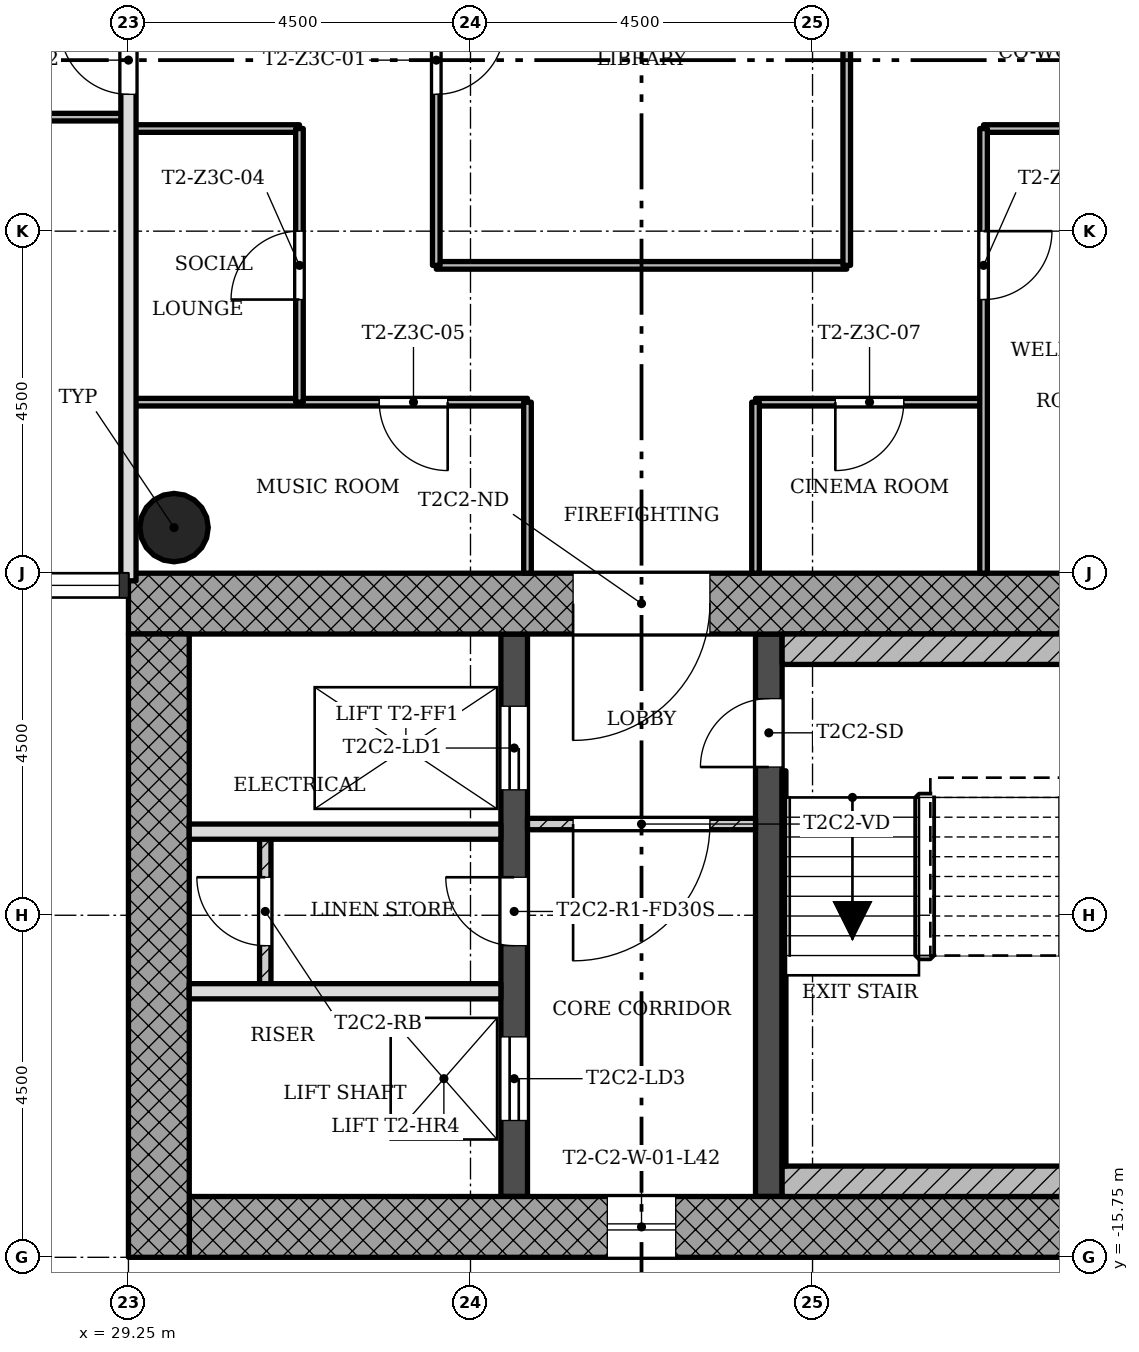
"""IFC4 building model, lengths in metres.
Left out: names, types, materials, properties, quantities, classifications, styles, units other than length and angle.
Written with IfcOpenShell. Run it as: python <this file> out.ifc"""

import sys

from ifc_helpers import new_model, si_unit, direction, frame, frame_2d, origin, origin_2d, place, context, subcontext, project, spatial, rectangle, hollow_circle, extrude, element, fill, save


model = new_model("IFC4")
c1 = context("Model", 3, precision=1e-05, world=origin(), true_north=direction((0.0, 1.0)))
c2 = subcontext(c1, "Body", "Model", "MODEL_VIEW")
j1 = project(units=[si_unit("LENGTHUNIT", "METRE"), si_unit("PLANEANGLEUNIT", "RADIAN")], contexts=[c1])
p1 = place(None, origin())
s1 = spatial("IfcSite", under=j1, at=p1, CompositionType="ELEMENT")
p2 = place(p1, origin())
s2 = spatial("IfcBuilding", under=s1, at=p2, CompositionType="ELEMENT")
p3 = place(p2, frame((0.0, 0.0, 154.1)))
s3 = spatial("IfcBuildingStorey", under=s2, at=p3, CompositionType="ELEMENT", Elevation=154.1)
p4 = place(p3, frame((30.05, -15.35, 0.0), z_axis=(0.0, 0.0, 1.0), x_axis=(1.0, 0.0, 0.0)))
e1 = element("IfcWall", 1, at=p4, inside=s3, PredefinedType="SHEAR", context=c2, shape_type="SweptSolid", body=[
    extrude(rectangle(XDim=12.7, YDim=0.8, at=frame_2d((6.35, 0.0))), origin(), (0.0, 0.0, 1.0), 3.4),
])
p5 = place(p4, frame((5.5, 0.0, 0.45)))
e2 = element("IfcOpeningElement", 2, at=p5, cuts=e1, PredefinedType="OPENING", context=c2, shape_type="SweptSolid", body=[
    extrude(rectangle(XDim=0.9, YDim=2.4, at=frame_2d((0.45, 1.2))), frame((0.0, 0.41, 0.0), z_axis=(0.0, -1.0, 0.0), x_axis=(1.0, 0.0, 0.0)), (0.0, 0.0, 1.0), 0.82),
])
p6 = place(p3, frame((41.95, -7.15, 0.0), z_axis=(0.0, 0.0, 1.0), x_axis=(-1.0, 0.0, 0.0)))
e3 = element("IfcWall", 3, at=p6, inside=s3, PredefinedType="SHEAR", context=c2, shape_type="SweptSolid", body=[
    extrude(rectangle(XDim=12.7, YDim=0.8, at=frame_2d((6.35, 0.0))), origin(), (0.0, 0.0, 1.0), 3.4),
])
p7 = place(p6, frame((5.05, 0.0, 0.0)))
e4 = element("IfcOpeningElement", 4, at=p7, cuts=e3, PredefinedType="OPENING", context=c2, shape_type="SweptSolid", body=[
    extrude(rectangle(XDim=1.8, YDim=2.1, at=frame_2d((0.9, 1.05))), frame((0.0, 0.41, 0.0), z_axis=(0.0, -1.0, 0.0), x_axis=(1.0, 0.0, 0.0)), (0.0, 0.0, 1.0), 0.82),
])
p8 = place(p3, frame((29.65, -7.55, 0.0), z_axis=(0.0, 0.0, 1.0), x_axis=(0.0, -1.0, 0.0)))
e5 = element("IfcWall", 5, at=p8, inside=s3, PredefinedType="SHEAR", context=c2, shape_type="SweptSolid", body=[
    extrude(rectangle(XDim=8.2, YDim=0.8, at=frame_2d((4.1, 0.0))), origin(), (0.0, 0.0, 1.0), 3.4),
])
p9 = place(p3, frame((34.325, -14.95, 0.0), z_axis=(0.0, 0.0, 1.0), x_axis=(0.0, 1.0, 0.0)))
e6 = element("IfcWall", 6, at=p9, inside=s3, PredefinedType="SHEAR", context=c2, shape_type="SweptSolid", body=[
    extrude(rectangle(XDim=7.4, YDim=0.35, at=frame_2d((3.7, 0.0))), origin(), (0.0, 0.0, 1.0), 3.4),
])
p10 = place(p9, frame((5.35, 0.0, 0.0)))
e7 = element("IfcOpeningElement", 7, at=p10, cuts=e6, PredefinedType="OPENING", context=c2, shape_type="SweptSolid", body=[
    extrude(rectangle(XDim=1.1, YDim=2.1, at=frame_2d((0.55, 1.05))), frame((0.0, 0.185, 0.0), z_axis=(0.0, -1.0, 0.0), x_axis=(1.0, 0.0, 0.0)), (0.0, 0.0, 1.0), 0.37),
])
p11 = place(p9, frame((1.0, 0.0, 0.0)))
e8 = element("IfcOpeningElement", 8, at=p11, cuts=e6, PredefinedType="OPENING", context=c2, shape_type="SweptSolid", body=[
    extrude(rectangle(XDim=1.1, YDim=2.1, at=frame_2d((0.55, 1.05))), frame((0.0, 0.185, 0.0), z_axis=(0.0, -1.0, 0.0), x_axis=(1.0, 0.0, 0.0)), (0.0, 0.0, 1.0), 0.37),
])
p12 = place(p9, frame((3.3, 0.0, 0.0)))
e9 = element("IfcOpeningElement", 9, at=p12, cuts=e6, PredefinedType="OPENING", context=c2, shape_type="SweptSolid", body=[
    extrude(rectangle(XDim=0.9, YDim=2.1, at=frame_2d((0.45, 1.05))), frame((0.0, 0.185, 0.0), z_axis=(0.0, -1.0, 0.0), x_axis=(1.0, 0.0, 0.0)), (0.0, 0.0, 1.0), 0.37),
])
p13 = place(p3, frame((37.675, -14.95, 0.0), z_axis=(0.0, 0.0, 1.0), x_axis=(0.0, 1.0, 0.0)))
e10 = element("IfcWall", 10, at=p13, inside=s3, PredefinedType="SHEAR", context=c2, shape_type="SweptSolid", body=[
    extrude(rectangle(XDim=7.4, YDim=0.35, at=frame_2d((3.7, 0.0))), origin(), (0.0, 0.0, 1.0), 3.4),
])
p14 = place(p13, frame((5.65, 0.0, 0.0)))
e11 = element("IfcOpeningElement", 11, at=p14, cuts=e10, PredefinedType="OPENING", context=c2, shape_type="SweptSolid", body=[
    extrude(rectangle(XDim=0.9, YDim=2.1, at=frame_2d((0.45, 1.05))), frame((0.0, 0.185, 0.0), z_axis=(0.0, -1.0, 0.0), x_axis=(1.0, 0.0, 0.0)), (0.0, 0.0, 1.0), 0.37),
])
p15 = place(p3, frame((29.85, -6.15, 0.0), z_axis=(0.0, 0.0, 1.0), x_axis=(1.0, 0.0, 0.0)))
e12 = element("IfcColumn", 12, at=p15, inside=s3, PredefinedType="COLUMN", context=c2, shape_type="SweptSolid", body=[
    extrude(hollow_circle(Radius=0.45, WallThickness=0.032, at=origin_2d()), origin(), (0.0, 0.0, 1.0), 3.4),
])
p16 = place(p3, frame((34.5, -10.05, 0.0), z_axis=(0.0, 0.0, 1.0), x_axis=(1.0, 0.0, 0.0)))
e13 = element("IfcWall", 13, at=p16, inside=s3, PredefinedType="PARTITIONING", context=c2, shape_type="SweptSolid", body=[
    extrude(rectangle(XDim=3.0, YDim=0.15, at=frame_2d((1.5, 0.0))), origin(), (0.0, 0.0, 1.0), 3.0),
])
p17 = place(p16, frame((0.6, 0.0, 0.0)))
e14 = element("IfcOpeningElement", 14, at=p17, cuts=e13, PredefinedType="OPENING", context=c2, shape_type="SweptSolid", body=[
    extrude(rectangle(XDim=1.8, YDim=2.1, at=frame_2d((0.9, 1.05))), frame((0.0, 0.085, 0.0), z_axis=(0.0, -1.0, 0.0), x_axis=(1.0, 0.0, 0.0)), (0.0, 0.0, 1.0), 0.17),
])
for number, where, z_axis, x_axis in (
    (15, (30.05, -12.25, 0.0), (0.0, 0.0, 1.0), (1.0, 0.0, 0.0)),
    (16, (30.05, -10.15, 0.0), (0.0, 0.0, 1.0), (1.0, 0.0, 0.0)),
):
    element("IfcWall", number, at=place(p3, frame(where, z_axis=z_axis, x_axis=x_axis)), inside=s3, PredefinedType="SOLIDWALL", context=c2, shape_type="SweptSolid", body=[
        extrude(rectangle(XDim=4.1, YDim=0.2, at=frame_2d((2.05, 0.0))), origin(), (0.0, 0.0, 1.0), 3.0),
    ])
p18 = place(p3, frame((31.05, -10.15, 0.0), z_axis=(0.0, 0.0, 1.0), x_axis=(0.0, -1.0, 0.0)))
e17 = element("IfcWall", 17, at=p18, inside=s3, PredefinedType="PARTITIONING", context=c2, shape_type="SweptSolid", body=[
    extrude(rectangle(XDim=2.1, YDim=0.15, at=frame_2d((1.05, 0.0))), origin(), (0.0, 0.0, 1.0), 3.0),
])
p19 = place(p18, frame((0.6, 0.0, 0.0)))
e18 = element("IfcOpeningElement", 18, at=p19, cuts=e17, PredefinedType="OPENING", context=c2, shape_type="SweptSolid", body=[
    extrude(rectangle(XDim=0.9, YDim=2.1, at=frame_2d((0.45, 1.05))), frame((0.0, 0.085, 0.0), z_axis=(0.0, -1.0, 0.0), x_axis=(1.0, 0.0, 0.0)), (0.0, 0.0, 1.0), 0.17),
])
p20 = place(p3, frame((40.5, -4.5, 0.0), z_axis=(0.0, 0.0, 1.0), x_axis=(-1.0, 0.0, 0.0)))
e19 = element("IfcWall", 19, at=p20, inside=s3, PredefinedType="PARTITIONING", context=c2, shape_type="SweptSolid", body=[
    extrude(rectangle(XDim=3.0, YDim=0.1, at=frame_2d((1.5, 0.0))), origin(), (0.0, 0.0, 1.0), 3.0),
])
p21 = place(p20, frame((1.05, 0.0, 0.0)))
e20 = element("IfcOpeningElement", 20, at=p21, cuts=e19, PredefinedType="OPENING", context=c2, shape_type="SweptSolid", body=[
    extrude(rectangle(XDim=0.9, YDim=2.1, at=frame_2d((0.45, 1.05))), frame((0.0, 0.06, 0.0), z_axis=(0.0, -1.0, 0.0), x_axis=(1.0, 0.0, 0.0)), (0.0, 0.0, 1.0), 0.12),
])
p22 = place(p3, frame((34.5, -4.5, 0.0), z_axis=(0.0, 0.0, 1.0), x_axis=(-1.0, 0.0, 0.0)))
e21 = element("IfcWall", 21, at=p22, inside=s3, PredefinedType="PARTITIONING", context=c2, shape_type="SweptSolid", body=[
    extrude(rectangle(XDim=5.25, YDim=0.1, at=frame_2d((2.625, 0.0))), origin(), (0.0, 0.0, 1.0), 3.0),
])
p23 = place(p22, frame((1.05, 0.0, 0.0)))
e22 = element("IfcOpeningElement", 22, at=p23, cuts=e21, PredefinedType="OPENING", context=c2, shape_type="SweptSolid", body=[
    extrude(rectangle(XDim=0.9, YDim=2.1, at=frame_2d((0.45, 1.05))), frame((0.0, 0.06, 0.0), z_axis=(0.0, -1.0, 0.0), x_axis=(1.0, 0.0, 0.0)), (0.0, 0.0, 1.0), 0.12),
])
p24 = place(p3, frame((38.7, -2.7, 0.0), z_axis=(0.0, 0.0, 1.0), x_axis=(-1.0, 0.0, 0.0)))
e23 = element("IfcWall", 23, at=p24, inside=s3, PredefinedType="PARTITIONING", context=c2, shape_type="SweptSolid", body=[
    extrude(rectangle(XDim=5.4, YDim=0.1, at=frame_2d((2.7, 0.0))), origin(), (0.0, 0.0, 1.0), 3.0),
])
p25 = place(p3, frame((44.55, -0.9, 0.0), z_axis=(0.0, 0.0, 1.0), x_axis=(-1.0, 0.0, 0.0)))
e24 = element("IfcWall", 24, at=p25, inside=s3, PredefinedType="PARTITIONING", context=c2, shape_type="SweptSolid", body=[
    extrude(rectangle(XDim=4.05, YDim=0.1, at=frame_2d((2.025, 0.0))), origin(), (0.0, 0.0, 1.0), 3.0),
])
p26 = place(p3, frame((31.5, -0.9, 0.0), z_axis=(0.0, 0.0, 1.0), x_axis=(-1.0, 0.0, 0.0)))
e25 = element("IfcWall", 25, at=p26, inside=s3, PredefinedType="PARTITIONING", context=c2, shape_type="SweptSolid", body=[
    extrude(rectangle(XDim=2.25, YDim=0.1, at=frame_2d((1.125, 0.0))), origin(), (0.0, 0.0, 1.0), 3.0),
])
p27 = place(p3, frame((29.25, -0.75, 0.0), z_axis=(0.0, 0.0, 1.0), x_axis=(-1.0, 0.0, 0.0)))
e26 = element("IfcWall", 26, at=p27, inside=s3, PredefinedType="PARTITIONING", context=c2, shape_type="SweptSolid", body=[
    extrude(rectangle(XDim=4.5, YDim=0.1, at=frame_2d((2.25, 0.0))), origin(), (0.0, 0.0, 1.0), 3.0),
])
p28 = place(p27, frame((1.8, 0.0, 0.0)))
e27 = element("IfcOpeningElement", 27, at=p28, cuts=e26, PredefinedType="OPENING", context=c2, shape_type="SweptSolid", body=[
    extrude(rectangle(XDim=0.9, YDim=2.1, at=frame_2d((0.45, 1.05))), frame((0.0, 0.06, 0.0), z_axis=(0.0, -1.0, 0.0), x_axis=(1.0, 0.0, 0.0)), (0.0, 0.0, 1.0), 0.12),
])
p29 = place(p3, frame((40.5, -6.75, 0.0), z_axis=(0.0, 0.0, 1.0), x_axis=(0.0, 1.0, 0.0)))
e28 = element("IfcWall", 28, at=p29, inside=s3, PredefinedType="PARTITIONING", context=c2, shape_type="SweptSolid", body=[
    extrude(rectangle(XDim=5.85, YDim=0.1, at=frame_2d((2.925, 0.0))), origin(), (0.0, 0.0, 1.0), 3.0),
])
p30 = place(p29, frame((3.6, 0.0, 0.0)))
e29 = element("IfcOpeningElement", 29, at=p30, cuts=e28, PredefinedType="OPENING", context=c2, shape_type="SweptSolid", body=[
    extrude(rectangle(XDim=0.9, YDim=2.1, at=frame_2d((0.45, 1.05))), frame((0.0, 0.06, 0.0), z_axis=(0.0, -1.0, 0.0), x_axis=(1.0, 0.0, 0.0)), (0.0, 0.0, 1.0), 0.12),
])
p31 = place(p3, frame((38.7, -2.7, 0.0), z_axis=(0.0, 0.0, 1.0), x_axis=(0.0, 1.0, 0.0)))
e30 = element("IfcWall", 30, at=p31, inside=s3, PredefinedType="PARTITIONING", context=c2, shape_type="SweptSolid", body=[
    extrude(rectangle(XDim=5.4, YDim=0.1, at=frame_2d((2.7, 0.0))), origin(), (0.0, 0.0, 1.0), 3.0),
])
for number, where, z_axis, x_axis in (
    (31, (37.5, -6.75, 0.0), (0.0, 0.0, 1.0), (0.0, 1.0, 0.0)),
    (32, (34.5, -6.75, 0.0), (0.0, 0.0, 1.0), (0.0, 1.0, 0.0)),
):
    element("IfcWall", number, at=place(p3, frame(where, z_axis=z_axis, x_axis=x_axis)), inside=s3, PredefinedType="PARTITIONING", context=c2, shape_type="SweptSolid", body=[
        extrude(rectangle(XDim=2.25, YDim=0.1, at=frame_2d((1.125, 0.0))), origin(), (0.0, 0.0, 1.0), 3.0),
    ])
p32 = place(p3, frame((33.3, -2.7, 0.0), z_axis=(0.0, 0.0, 1.0), x_axis=(0.0, 1.0, 0.0)))
e33 = element("IfcWall", 33, at=p32, inside=s3, PredefinedType="PARTITIONING", context=c2, shape_type="SweptSolid", body=[
    extrude(rectangle(XDim=5.4, YDim=0.1, at=frame_2d((2.7, 0.0))), origin(), (0.0, 0.0, 1.0), 3.0),
])
p33 = place(p32, frame((2.25, 0.0, 0.0)))
e34 = element("IfcOpeningElement", 34, at=p33, cuts=e33, PredefinedType="OPENING", context=c2, shape_type="SweptSolid", body=[
    extrude(rectangle(XDim=0.9, YDim=2.1, at=frame_2d((0.45, 1.05))), frame((0.0, 0.06, 0.0), z_axis=(0.0, -1.0, 0.0), x_axis=(1.0, 0.0, 0.0)), (0.0, 0.0, 1.0), 0.12),
])
p34 = place(p3, frame((31.5, -4.5, 0.0), z_axis=(0.0, 0.0, 1.0), x_axis=(0.0, 1.0, 0.0)))
e35 = element("IfcWall", 35, at=p34, inside=s3, PredefinedType="PARTITIONING", context=c2, shape_type="SweptSolid", body=[
    extrude(rectangle(XDim=3.6, YDim=0.1, at=frame_2d((1.8, 0.0))), origin(), (0.0, 0.0, 1.0), 3.0),
])
p35 = place(p34, frame((1.35, 0.0, 0.0)))
e36 = element("IfcOpeningElement", 36, at=p35, cuts=e35, PredefinedType="OPENING", context=c2, shape_type="SweptSolid", body=[
    extrude(rectangle(XDim=0.9, YDim=2.1, at=frame_2d((0.45, 1.05))), frame((0.0, 0.06, 0.0), z_axis=(0.0, -1.0, 0.0), x_axis=(1.0, 0.0, 0.0)), (0.0, 0.0, 1.0), 0.12),
])
p36 = place(p3, frame((29.25, -6.85, 0.0), z_axis=(0.0, 0.0, 1.0), x_axis=(0.0, 1.0, 0.0)))
e37 = element("IfcWall", 37, at=p36, inside=s3, PredefinedType="SOLIDWALL", context=c2, shape_type="SweptSolid", body=[
    extrude(rectangle(XDim=13.7, YDim=0.2, at=frame_2d((6.85, 0.0))), origin(), (0.0, 0.0, 1.0), 3.0),
])
p37 = place(p36, frame((6.4, 0.0, 0.0)))
e38 = element("IfcOpeningElement", 38, at=p37, cuts=e37, PredefinedType="OPENING", context=c2, shape_type="SweptSolid", body=[
    extrude(rectangle(XDim=0.9, YDim=2.1, at=frame_2d((0.45, 1.05))), frame((0.0, 0.11, 0.0), z_axis=(0.0, -1.0, 0.0), x_axis=(1.0, 0.0, 0.0)), (0.0, 0.0, 1.0), 0.22),
])
for number, where, z_axis, x_axis in (
    (39, (37.85, -14.75, 0.0), (0.0, 0.0, 1.0), (1.0, 0.0, 0.0)),
    (40, (37.85, -7.75, 0.0), (0.0, 0.0, 1.0), (1.0, 0.0, 0.0)),
):
    element("IfcWall", number, at=place(p3, frame(where, z_axis=z_axis, x_axis=x_axis)), inside=s3, PredefinedType="SHEAR", context=c2, shape_type="SweptSolid", body=[
        extrude(rectangle(XDim=4.1, YDim=0.4, at=frame_2d((2.05, 0.0))), origin(), (0.0, 0.0, 1.0), 3.4),
    ])
p38 = place(p3, frame((37.875, -9.35, 0.0), z_axis=(0.0, 0.0, 1.0), x_axis=(0.0, -1.0, 0.0)))
e41 = element("IfcWall", 41, at=p38, inside=s3, PredefinedType="SHEAR", context=c2, shape_type="SweptSolid", body=[
    extrude(rectangle(XDim=5.2, YDim=0.05, at=frame_2d((2.6, 0.0))), origin(), (0.0, 0.0, 1.0), 3.4),
])
p39 = place(p5, origin())
e42 = element("IfcWindow", 42, at=p39, inside=s3, PartitioningType="SINGLE_PANEL", PredefinedType="WINDOW", context=c2, shape_type="SweptSolid", body=[
    extrude(rectangle(XDim=0.9, YDim=2.4, at=frame_2d((0.45, 1.2))), frame((0.0, 0.03, 0.0), z_axis=(0.0, -1.0, 0.0), x_axis=(1.0, 0.0, 0.0)), (0.0, 0.0, 1.0), 0.06),
])
fill(e2, e42)
p40 = place(p17, origin())
e43 = element("IfcDoor", 43, at=p40, inside=s3, OperationType="SINGLE_SWING_LEFT", PredefinedType="DOOR", context=c2, shape_type="SweptSolid", body=[
    extrude(rectangle(XDim=1.8, YDim=2.1, at=frame_2d((0.9, 1.05))), frame((0.0, 0.025, 0.0), z_axis=(0.0, -1.0, 0.0), x_axis=(1.0, 0.0, 0.0)), (0.0, 0.0, 1.0), 0.05),
])
fill(e14, e43)
p41 = place(p19, origin())
e44 = element("IfcDoor", 44, at=p41, inside=s3, OperationType="SINGLE_SWING_LEFT", PredefinedType="DOOR", context=c2, shape_type="SweptSolid", body=[
    extrude(rectangle(XDim=0.9, YDim=2.1, at=frame_2d((0.45, 1.05))), frame((0.0, 0.025, 0.0), z_axis=(0.0, -1.0, 0.0), x_axis=(1.0, 0.0, 0.0)), (0.0, 0.0, 1.0), 0.05),
])
fill(e18, e44)
p42 = place(p33, origin())
e45 = element("IfcDoor", 45, at=p42, inside=s3, OperationType="SINGLE_SWING_RIGHT", PredefinedType="DOOR", context=c2, shape_type="SweptSolid", body=[
    extrude(rectangle(XDim=0.9, YDim=2.1, at=frame_2d((0.45, 1.05))), frame((0.0, 0.025, 0.0), z_axis=(0.0, -1.0, 0.0), x_axis=(1.0, 0.0, 0.0)), (0.0, 0.0, 1.0), 0.05),
])
fill(e34, e45)
p43 = place(p35, origin())
e46 = element("IfcDoor", 46, at=p43, inside=s3, OperationType="SINGLE_SWING_RIGHT", PredefinedType="DOOR", context=c2, shape_type="SweptSolid", body=[
    extrude(rectangle(XDim=0.9, YDim=2.1, at=frame_2d((0.45, 1.05))), frame((0.0, 0.025, 0.0), z_axis=(0.0, -1.0, 0.0), x_axis=(1.0, 0.0, 0.0)), (0.0, 0.0, 1.0), 0.05),
])
fill(e36, e46)
p44 = place(p23, origin())
e47 = element("IfcDoor", 47, at=p44, inside=s3, OperationType="SINGLE_SWING_RIGHT", PredefinedType="DOOR", context=c2, shape_type="SweptSolid", body=[
    extrude(rectangle(XDim=0.9, YDim=2.1, at=frame_2d((0.45, 1.05))), frame((0.0, 0.025, 0.0), z_axis=(0.0, -1.0, 0.0), x_axis=(1.0, 0.0, 0.0)), (0.0, 0.0, 1.0), 0.05),
])
fill(e22, e47)
p45 = place(p30, origin())
e48 = element("IfcDoor", 48, at=p45, inside=s3, OperationType="SINGLE_SWING_RIGHT", PredefinedType="DOOR", context=c2, shape_type="SweptSolid", body=[
    extrude(rectangle(XDim=0.9, YDim=2.1, at=frame_2d((0.45, 1.05))), frame((0.0, 0.025, 0.0), z_axis=(0.0, -1.0, 0.0), x_axis=(1.0, 0.0, 0.0)), (0.0, 0.0, 1.0), 0.05),
])
fill(e29, e48)
p46 = place(p21, origin())
e49 = element("IfcDoor", 49, at=p46, inside=s3, OperationType="SINGLE_SWING_LEFT", PredefinedType="DOOR", context=c2, shape_type="SweptSolid", body=[
    extrude(rectangle(XDim=0.9, YDim=2.1, at=frame_2d((0.45, 1.05))), frame((0.0, 0.025, 0.0), z_axis=(0.0, -1.0, 0.0), x_axis=(1.0, 0.0, 0.0)), (0.0, 0.0, 1.0), 0.05),
])
fill(e20, e49)
p47 = place(p37, origin())
e50 = element("IfcDoor", 50, at=p47, inside=s3, OperationType="SINGLE_SWING_LEFT", PredefinedType="DOOR", context=c2, shape_type="SweptSolid", body=[
    extrude(rectangle(XDim=0.9, YDim=2.1, at=frame_2d((0.45, 1.05))), frame((0.0, 0.025, 0.0), z_axis=(0.0, -1.0, 0.0), x_axis=(1.0, 0.0, 0.0)), (0.0, 0.0, 1.0), 0.05),
])
fill(e38, e50)
p48 = place(p14, origin())
e51 = element("IfcDoor", 51, at=p48, inside=s3, OperationType="SINGLE_SWING_RIGHT", PredefinedType="DOOR", context=c2, shape_type="SweptSolid", body=[
    extrude(rectangle(XDim=0.9, YDim=2.1, at=frame_2d((0.45, 1.05))), frame((0.0, 0.025, 0.0), z_axis=(0.0, -1.0, 0.0), x_axis=(1.0, 0.0, 0.0)), (0.0, 0.0, 1.0), 0.05),
])
fill(e11, e51)
p49 = place(p10, origin())
e52 = element("IfcDoor", 52, at=p49, inside=s3, OperationType="SLIDING_TO_LEFT", PredefinedType="DOOR", context=c2, shape_type="SweptSolid", body=[
    extrude(rectangle(XDim=1.1, YDim=2.1, at=frame_2d((0.55, 1.05))), frame((0.0, 0.025, 0.0), z_axis=(0.0, -1.0, 0.0), x_axis=(1.0, 0.0, 0.0)), (0.0, 0.0, 1.0), 0.05),
])
fill(e7, e52)
p50 = place(p11, origin())
e53 = element("IfcDoor", 53, at=p50, inside=s3, OperationType="SLIDING_TO_LEFT", PredefinedType="DOOR", context=c2, shape_type="SweptSolid", body=[
    extrude(rectangle(XDim=1.1, YDim=2.1, at=frame_2d((0.55, 1.05))), frame((0.0, 0.025, 0.0), z_axis=(0.0, -1.0, 0.0), x_axis=(1.0, 0.0, 0.0)), (0.0, 0.0, 1.0), 0.05),
])
fill(e8, e53)
p51 = place(p12, origin())
e54 = element("IfcDoor", 54, at=p51, inside=s3, OperationType="SINGLE_SWING_LEFT", PredefinedType="DOOR", context=c2, shape_type="SweptSolid", body=[
    extrude(rectangle(XDim=0.9, YDim=2.1, at=frame_2d((0.45, 1.05))), frame((0.0, 0.025, 0.0), z_axis=(0.0, -1.0, 0.0), x_axis=(1.0, 0.0, 0.0)), (0.0, 0.0, 1.0), 0.05),
])
fill(e9, e54)
p52 = place(p7, origin())
e55 = element("IfcDoor", 55, at=p52, inside=s3, OperationType="SINGLE_SWING_LEFT", PredefinedType="DOOR", context=c2, shape_type="SweptSolid", body=[
    extrude(rectangle(XDim=1.8, YDim=2.1, at=frame_2d((0.9, 1.05))), frame((0.0, 0.025, 0.0), z_axis=(0.0, -1.0, 0.0), x_axis=(1.0, 0.0, 0.0)), (0.0, 0.0, 1.0), 0.05),
])
fill(e4, e55)
save(model, sys.argv[1])
